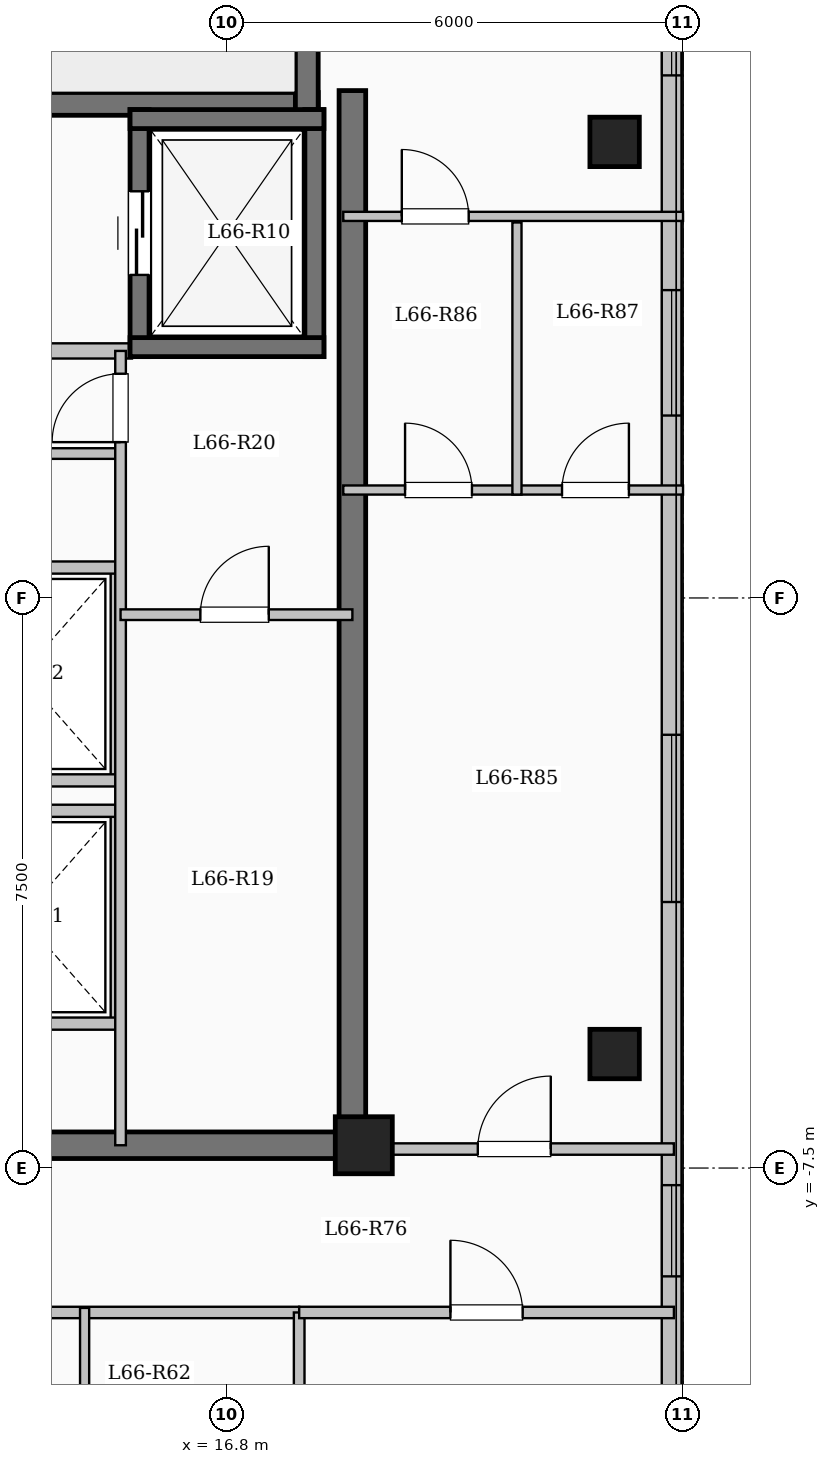
"""IFC4 building model, lengths in metres.
Left out: names, types, materials, properties, quantities, classifications, styles, units other than length and angle.
Written with IfcOpenShell. Run it as: python <this file> out.ifc"""

import sys

from ifc_helpers import new_model, si_unit, direction, frame, frame_2d, origin, origin_2d, place, context, subcontext, project, spatial, rectangle, extrude, element, fill, save


model = new_model("IFC4")
c1 = context("Model", 3, precision=1e-05, world=origin(), true_north=direction((0.0, 1.0)))
c2 = subcontext(c1, "Body", "Model", "MODEL_VIEW")
j1 = project(units=[si_unit("LENGTHUNIT", "METRE"), si_unit("PLANEANGLEUNIT", "RADIAN")], contexts=[c1])
p1 = place(None, origin())
s1 = spatial("IfcSite", under=j1, at=p1, CompositionType="ELEMENT")
p2 = place(p1, origin())
s2 = spatial("IfcBuilding", under=s1, at=p2, CompositionType="ELEMENT")
p3 = place(p2, frame((0.0, 0.0, 244.85)))
s3 = spatial("IfcBuildingStorey", under=s2, at=p3, CompositionType="ELEMENT", Elevation=244.85)
p4 = place(p3, frame((18.6, -7.2, 0.0), z_axis=(0.0, 0.0, 1.0), x_axis=(1.0, 0.0, 0.0)))
e1 = element("IfcColumn", 1, at=p4, inside=s3, PredefinedType="COLUMN", context=c2, shape_type="SweptSolid", body=[
    extrude(rectangle(XDim=0.75, YDim=0.75, at=origin_2d()), origin(), (0.0, 0.0, 1.0), 3.35),
])
for number, where, z_axis, x_axis in (
    (2, (21.9, -6.0, 0.0), (0.0, 0.0, 1.0), (1.0, 0.0, 0.0)),
    (3, (21.9, 6.0, 0.0), (0.0, 0.0, 1.0), (1.0, 0.0, 0.0)),
):
    element("IfcColumn", number, at=place(p3, frame(where, z_axis=z_axis, x_axis=x_axis)), inside=s3, PredefinedType="COLUMN", context=c2, shape_type="SweptSolid", body=[
        extrude(rectangle(XDim=0.65, YDim=0.65, at=origin_2d()), origin(), (0.0, 0.0, 1.0), 3.35),
    ])
p5 = place(p3, frame((22.65, 17.55, 0.0), z_axis=(0.0, 0.0, 1.0), x_axis=(0.0, -1.0, 0.0)))
e4 = element("IfcWall", 4, at=p5, inside=s3, PredefinedType="SOLIDWALL", context=c2, shape_type="SweptSolid", body=[
    extrude(rectangle(XDim=35.1, YDim=0.26, at=frame_2d((17.55, 0.0))), origin(), (0.0, 0.0, 1.0), 3.1),
])
p6 = place(p5, frame((1.525, 0.0, 0.9)))
e5 = element("IfcOpeningElement", 5, at=p6, cuts=e4, PredefinedType="OPENING", context=c2, shape_type="SweptSolid", body=[
    extrude(rectangle(XDim=2.0, YDim=1.7, at=frame_2d((1.0, 0.85))), frame((0.0, 0.14, 0.0), z_axis=(0.0, -1.0, 0.0), x_axis=(1.0, 0.0, 0.0)), (0.0, 0.0, 1.0), 0.28),
])
p7 = place(p5, frame((5.425, 0.0, 0.95)))
e6 = element("IfcOpeningElement", 6, at=p7, cuts=e4, PredefinedType="OPENING", context=c2, shape_type="SweptSolid", body=[
    extrude(rectangle(XDim=1.0, YDim=1.5, at=frame_2d((0.5, 0.75))), frame((0.0, 0.14, 0.0), z_axis=(0.0, -1.0, 0.0), x_axis=(1.0, 0.0, 0.0)), (0.0, 0.0, 1.0), 0.28),
])
p8 = place(p5, frame((8.675, 0.0, 0.9)))
e7 = element("IfcOpeningElement", 7, at=p8, cuts=e4, PredefinedType="OPENING", context=c2, shape_type="SweptSolid", body=[
    extrude(rectangle(XDim=2.0, YDim=1.7, at=frame_2d((1.0, 0.85))), frame((0.0, 0.14, 0.0), z_axis=(0.0, -1.0, 0.0), x_axis=(1.0, 0.0, 0.0)), (0.0, 0.0, 1.0), 0.28),
])
p9 = place(p5, frame((13.5, 0.0, 0.9)))
e8 = element("IfcOpeningElement", 8, at=p9, cuts=e4, PredefinedType="OPENING", context=c2, shape_type="SweptSolid", body=[
    extrude(rectangle(XDim=1.65, YDim=1.6, at=frame_2d((0.825, 0.8))), frame((0.0, 0.14, 0.0), z_axis=(0.0, -1.0, 0.0), x_axis=(1.0, 0.0, 0.0)), (0.0, 0.0, 1.0), 0.28),
])
p10 = place(p5, frame((19.35, 0.0, 0.9)))
e9 = element("IfcOpeningElement", 9, at=p10, cuts=e4, PredefinedType="OPENING", context=c2, shape_type="SweptSolid", body=[
    extrude(rectangle(XDim=2.2, YDim=1.75, at=frame_2d((1.1, 0.875))), frame((0.0, 0.14, 0.0), z_axis=(0.0, -1.0, 0.0), x_axis=(1.0, 0.0, 0.0)), (0.0, 0.0, 1.0), 0.28),
])
p11 = place(p5, frame((25.275, 0.0, 0.95)))
e10 = element("IfcOpeningElement", 10, at=p11, cuts=e4, PredefinedType="OPENING", context=c2, shape_type="SweptSolid", body=[
    extrude(rectangle(XDim=1.2, YDim=1.5, at=frame_2d((0.6, 0.75))), frame((0.0, 0.14, 0.0), z_axis=(0.0, -1.0, 0.0), x_axis=(1.0, 0.0, 0.0)), (0.0, 0.0, 1.0), 0.28),
])
p12 = place(p5, frame((29.925, 0.0, 0.9)))
e11 = element("IfcOpeningElement", 11, at=p12, cuts=e4, PredefinedType="OPENING", context=c2, shape_type="SweptSolid", body=[
    extrude(rectangle(XDim=2.2, YDim=1.75, at=frame_2d((1.1, 0.875))), frame((0.0, 0.14, 0.0), z_axis=(0.0, -1.0, 0.0), x_axis=(1.0, 0.0, 0.0)), (0.0, 0.0, 1.0), 0.28),
])
p13 = place(p3, frame((10.0, 6.5, 0.0), z_axis=(0.0, 0.0, 1.0), x_axis=(1.0, 0.0, 0.0)))
e12 = element("IfcWall", 12, at=p13, inside=s3, PredefinedType="SHEAR", context=c2, shape_type="SweptSolid", body=[
    extrude(rectangle(XDim=8.0, YDim=0.3, at=frame_2d((4.0, 0.0))), origin(), (0.0, 0.0, 1.0), 3.35),
])
p14 = place(p13, frame((0.55, 0.0, 0.0)))
e13 = element("IfcOpeningElement", 13, at=p14, cuts=e12, PredefinedType="OPENING", context=c2, shape_type="SweptSolid", body=[
    extrude(rectangle(XDim=1.0, YDim=2.15, at=frame_2d((0.5, 1.075))), frame((0.0, 0.16, 0.0), z_axis=(0.0, -1.0, 0.0), x_axis=(1.0, 0.0, 0.0)), (0.0, 0.0, 1.0), 0.32),
])
p15 = place(p3, frame((17.85, 6.35, 0.0), z_axis=(0.0, 0.0, 1.0), x_axis=(0.0, 1.0, 0.0)))
e14 = element("IfcWall", 14, at=p15, inside=s3, PredefinedType="SHEAR", context=c2, shape_type="SweptSolid", body=[
    extrude(rectangle(XDim=3.59, YDim=0.3, at=frame_2d((1.795, 0.0))), origin(), (0.0, 0.0, 1.0), 3.35),
])
p16 = place(p3, frame((10.15, 3.25, 0.0), z_axis=(0.0, 0.0, 1.0), x_axis=(1.0, 0.0, 0.0)))
e15 = element("IfcWall", 15, at=p16, inside=s3, PredefinedType="SOLIDWALL", context=c2, shape_type="SweptSolid", body=[
    extrude(rectangle(XDim=5.4, YDim=0.2, at=frame_2d((2.7, 0.0))), origin(), (0.0, 0.0, 1.0), 3.1),
])
p17 = place(p3, frame((15.65, 3.175, 0.0), z_axis=(0.0, 0.0, 1.0), x_axis=(0.0, 1.0, 0.0)))
e16 = element("IfcWall", 16, at=p17, inside=s3, PredefinedType="SHEAR", context=c2, shape_type="SweptSolid", body=[
    extrude(rectangle(XDim=3.25, YDim=0.25, at=frame_2d((1.625, 0.0))), origin(), (0.0, 0.0, 1.0), 3.35),
])
p18 = place(p17, frame((1.075, 0.0, 0.0)))
e17 = element("IfcOpeningElement", 17, at=p18, cuts=e16, PredefinedType="OPENING", context=c2, shape_type="SweptSolid", body=[
    extrude(rectangle(XDim=1.1, YDim=2.15, at=frame_2d((0.55, 1.075))), frame((0.0, 0.135, 0.0), z_axis=(0.0, -1.0, 0.0), x_axis=(1.0, 0.0, 0.0)), (0.0, 0.0, 1.0), 0.27),
])
p19 = place(p3, frame((17.95, 3.175, 0.0), z_axis=(0.0, 0.0, 1.0), x_axis=(0.0, 1.0, 0.0)))
e18 = element("IfcWall", 18, at=p19, inside=s3, PredefinedType="SHEAR", context=c2, shape_type="SweptSolid", body=[
    extrude(rectangle(XDim=3.25, YDim=0.25, at=frame_2d((1.625, 0.0))), origin(), (0.0, 0.0, 1.0), 3.35),
])
for number, where, z_axis, x_axis in (
    (19, (15.525, 3.3, 0.0), (0.0, 0.0, 1.0), (1.0, 0.0, 0.0)),
    (20, (15.525, 6.3, 0.0), (0.0, 0.0, 1.0), (1.0, 0.0, 0.0)),
):
    element("IfcWall", number, at=place(p3, frame(where, z_axis=z_axis, x_axis=x_axis)), inside=s3, PredefinedType="SHEAR", context=c2, shape_type="SweptSolid", body=[
        extrude(rectangle(XDim=2.55, YDim=0.25, at=frame_2d((1.275, 0.0))), origin(), (0.0, 0.0, 1.0), 3.35),
    ])
p20 = place(p3, frame((15.35, -5.6, 0.0), z_axis=(0.0, 0.0, 1.0), x_axis=(0.0, 1.0, 0.0)))
e21 = element("IfcWall", 21, at=p20, inside=s3, PredefinedType="SOLIDWALL", context=c2, shape_type="SweptSolid", body=[
    extrude(rectangle(XDim=2.8, YDim=0.16, at=frame_2d((1.4, 0.0))), origin(), (0.0, 0.0, 1.0), 3.1),
])
for number, where, z_axis, x_axis in (
    (22, (12.85, -5.6, 0.0), (0.0, 0.0, 1.0), (1.0, 0.0, 0.0)),
    (23, (12.85, -2.8, 0.0), (0.0, 0.0, 1.0), (1.0, 0.0, 0.0)),
):
    element("IfcWall", number, at=place(p3, frame(where, z_axis=z_axis, x_axis=x_axis)), inside=s3, PredefinedType="SOLIDWALL", context=c2, shape_type="SweptSolid", body=[
        extrude(rectangle(XDim=2.5, YDim=0.16, at=frame_2d((1.25, 0.0))), origin(), (0.0, 0.0, 1.0), 3.1),
    ])
p21 = place(p3, frame((15.35, -2.4, 0.0), z_axis=(0.0, 0.0, 1.0), x_axis=(0.0, 1.0, 0.0)))
e24 = element("IfcWall", 24, at=p21, inside=s3, PredefinedType="SOLIDWALL", context=c2, shape_type="SweptSolid", body=[
    extrude(rectangle(XDim=2.8, YDim=0.16, at=frame_2d((1.4, 0.0))), origin(), (0.0, 0.0, 1.0), 3.1),
])
for number, where, z_axis, x_axis in (
    (25, (12.85, -2.4, 0.0), (0.0, 0.0, 1.0), (1.0, 0.0, 0.0)),
    (26, (12.85, 0.4, 0.0), (0.0, 0.0, 1.0), (1.0, 0.0, 0.0)),
):
    element("IfcWall", number, at=place(p3, frame(where, z_axis=z_axis, x_axis=x_axis)), inside=s3, PredefinedType="SOLIDWALL", context=c2, shape_type="SweptSolid", body=[
        extrude(rectangle(XDim=2.5, YDim=0.16, at=frame_2d((1.25, 0.0))), origin(), (0.0, 0.0, 1.0), 3.1),
    ])
p22 = place(p3, frame((18.45, -7.375, 0.0), z_axis=(0.0, 0.0, 1.0), x_axis=(0.0, 1.0, 0.0)))
e27 = element("IfcWall", 27, at=p22, inside=s3, PredefinedType="SHEAR", context=c2, shape_type="SweptSolid", body=[
    extrude(rectangle(XDim=14.05, YDim=0.35, at=frame_2d((7.025, 0.0))), origin(), (0.0, 0.0, 1.0), 3.35),
])
p23 = place(p3, frame((12.625, -7.2, 0.0), z_axis=(0.0, 0.0, 1.0), x_axis=(1.0, 0.0, 0.0)))
e28 = element("IfcWall", 28, at=p23, inside=s3, PredefinedType="SHEAR", context=c2, shape_type="SweptSolid", body=[
    extrude(rectangle(XDim=6.0, YDim=0.35, at=frame_2d((3.0, 0.0))), origin(), (0.0, 0.0, 1.0), 3.35),
])
p24 = place(p3, frame((12.8, 1.9, 0.0), z_axis=(0.0, 0.0, 1.0), x_axis=(1.0, 0.0, 0.0)))
e29 = element("IfcWall", 29, at=p24, inside=s3, PredefinedType="PARTITIONING", context=c2, shape_type="SweptSolid", body=[
    extrude(rectangle(XDim=2.6, YDim=0.14, at=frame_2d((1.3, 0.0))), origin(), (0.0, 0.0, 1.0), 3.1),
])
p25 = place(p3, frame((15.4, -7.2, 0.0), z_axis=(0.0, 0.0, 1.0), x_axis=(0.0, 1.0, 0.0)))
e30 = element("IfcWall", 30, at=p25, inside=s3, PredefinedType="PARTITIONING", context=c2, shape_type="SweptSolid", body=[
    extrude(rectangle(XDim=10.45, YDim=0.14, at=frame_2d((5.225, 0.0))), origin(), (0.0, 0.0, 1.0), 3.1),
])
p26 = place(p25, frame((9.25, 0.0, 0.0)))
e31 = element("IfcOpeningElement", 31, at=p26, cuts=e30, PredefinedType="OPENING", context=c2, shape_type="SweptSolid", body=[
    extrude(rectangle(XDim=0.9, YDim=2.08, at=frame_2d((0.45, 1.04))), frame((0.0, 0.08, 0.0), z_axis=(0.0, -1.0, 0.0), x_axis=(1.0, 0.0, 0.0)), (0.0, 0.0, 1.0), 0.16),
])
p27 = place(p3, frame((15.4, -0.22, 0.0), z_axis=(0.0, 0.0, 1.0), x_axis=(1.0, 0.0, 0.0)))
e32 = element("IfcWall", 32, at=p27, inside=s3, PredefinedType="PARTITIONING", context=c2, shape_type="SweptSolid", body=[
    extrude(rectangle(XDim=3.05, YDim=0.14, at=frame_2d((1.525, 0.0))), origin(), (0.0, 0.0, 1.0), 3.1),
])
p28 = place(p27, frame((1.05, 0.0, 0.0)))
e33 = element("IfcOpeningElement", 33, at=p28, cuts=e32, PredefinedType="OPENING", context=c2, shape_type="SweptSolid", body=[
    extrude(rectangle(XDim=0.9, YDim=2.08, at=frame_2d((0.45, 1.04))), frame((0.0, 0.08, 0.0), z_axis=(0.0, -1.0, 0.0), x_axis=(1.0, 0.0, 0.0)), (0.0, 0.0, 1.0), 0.16),
])
p29 = place(p3, frame((8.55, -9.4, 0.0), z_axis=(0.0, 0.0, 1.0), x_axis=(1.0, 0.0, 0.0)))
e34 = element("IfcWall", 34, at=p29, inside=s3, PredefinedType="PARTITIONING", context=c2, shape_type="SweptSolid", body=[
    extrude(rectangle(XDim=9.2, YDim=0.15, at=frame_2d((4.6, 0.0))), origin(), (0.0, 0.0, 1.0), 3.1),
])
p30 = place(p29, frame((0.75, 0.0, 0.0)))
e35 = element("IfcOpeningElement", 35, at=p30, cuts=e34, PredefinedType="OPENING", context=c2, shape_type="SweptSolid", body=[
    extrude(rectangle(XDim=0.96, YDim=2.15, at=frame_2d((0.48, 1.075))), frame((0.0, 0.085, 0.0), z_axis=(0.0, -1.0, 0.0), x_axis=(1.0, 0.0, 0.0)), (0.0, 0.0, 1.0), 0.17),
])
p31 = place(p3, frame((14.927, -12.14, 0.0), z_axis=(0.0, 0.0, 1.0), x_axis=(0.0, 1.0, 0.0)))
e36 = element("IfcWall", 36, at=p31, inside=s3, PredefinedType="PARTITIONING", context=c2, shape_type="SweptSolid", body=[
    extrude(rectangle(XDim=2.8, YDim=0.12, at=frame_2d((1.4, 0.0))), origin(), (0.0, 0.0, 1.0), 2.685),
])
p32 = place(p3, frame((18.45, -7.25, 0.0), z_axis=(0.0, 0.0, 1.0), x_axis=(1.0, 0.0, 0.0)))
e37 = element("IfcWall", 37, at=p32, inside=s3, PredefinedType="PARTITIONING", context=c2, shape_type="SweptSolid", body=[
    extrude(rectangle(XDim=4.23, YDim=0.15, at=frame_2d((2.115, 0.0))), origin(), (0.0, 0.0, 1.0), 3.1),
])
p33 = place(p32, frame((1.65, 0.0, 0.0)))
e38 = element("IfcOpeningElement", 38, at=p33, cuts=e37, PredefinedType="OPENING", context=c2, shape_type="SweptSolid", body=[
    extrude(rectangle(XDim=0.96, YDim=2.15, at=frame_2d((0.48, 1.075))), frame((0.0, 0.085, 0.0), z_axis=(0.0, -1.0, 0.0), x_axis=(1.0, 0.0, 0.0)), (0.0, 0.0, 1.0), 0.17),
])
p34 = place(p3, frame((17.75, -17.55, 0.0), z_axis=(0.0, 0.0, 1.0), x_axis=(0.0, 1.0, 0.0)))
e39 = element("IfcWall", 39, at=p34, inside=s3, PredefinedType="PARTITIONING", context=c2, shape_type="SweptSolid", body=[
    extrude(rectangle(XDim=8.15, YDim=0.14, at=frame_2d((4.075, 0.0))), origin(), (0.0, 0.0, 1.0), 3.1),
])
p35 = place(p3, frame((17.75, -9.4, 0.0), z_axis=(0.0, 0.0, 1.0), x_axis=(1.0, 0.0, 0.0)))
e40 = element("IfcWall", 40, at=p35, inside=s3, PredefinedType="PARTITIONING", context=c2, shape_type="SweptSolid", body=[
    extrude(rectangle(XDim=4.93, YDim=0.15, at=frame_2d((2.465, 0.0))), origin(), (0.0, 0.0, 1.0), 3.1),
])
p36 = place(p35, frame((1.99, 0.0, 0.0)))
e41 = element("IfcOpeningElement", 41, at=p36, cuts=e40, PredefinedType="OPENING", context=c2, shape_type="SweptSolid", body=[
    extrude(rectangle(XDim=0.95, YDim=2.15, at=frame_2d((0.475, 1.075))), frame((0.0, 0.085, 0.0), z_axis=(0.0, -1.0, 0.0), x_axis=(1.0, 0.0, 0.0)), (0.0, 0.0, 1.0), 0.17),
])
p37 = place(p3, frame((18.33, 1.42, 0.0), z_axis=(0.0, 0.0, 1.0), x_axis=(1.0, 0.0, 0.0)))
e42 = element("IfcWall", 42, at=p37, inside=s3, PredefinedType="PARTITIONING", context=c2, shape_type="SweptSolid", body=[
    extrude(rectangle(XDim=4.47, YDim=0.12, at=frame_2d((2.235, 0.0))), origin(), (0.0, 0.0, 1.0), 3.1),
])
p38 = place(p37, frame((0.813, 0.0, 0.0)))
e43 = element("IfcOpeningElement", 43, at=p38, cuts=e42, PredefinedType="OPENING", context=c2, shape_type="SweptSolid", body=[
    extrude(rectangle(XDim=0.88, YDim=2.1, at=frame_2d((0.44, 1.05))), frame((0.0, 0.07, 0.0), z_axis=(0.0, -1.0, 0.0), x_axis=(1.0, 0.0, 0.0)), (0.0, 0.0, 1.0), 0.14),
])
p39 = place(p37, frame((2.878, 0.0, 0.0)))
e44 = element("IfcOpeningElement", 44, at=p39, cuts=e42, PredefinedType="OPENING", context=c2, shape_type="SweptSolid", body=[
    extrude(rectangle(XDim=0.88, YDim=2.1, at=frame_2d((0.44, 1.05))), frame((0.0, 0.07, 0.0), z_axis=(0.0, -1.0, 0.0), x_axis=(1.0, 0.0, 0.0)), (0.0, 0.0, 1.0), 0.14),
])
p40 = place(p3, frame((18.33, 5.02, 0.0), z_axis=(0.0, 0.0, 1.0), x_axis=(1.0, 0.0, 0.0)))
e45 = element("IfcWall", 45, at=p40, inside=s3, PredefinedType="PARTITIONING", context=c2, shape_type="SweptSolid", body=[
    extrude(rectangle(XDim=4.47, YDim=0.12, at=frame_2d((2.235, 0.0))), origin(), (0.0, 0.0, 1.0), 3.1),
])
p41 = place(p40, frame((0.77, 0.0, 0.0)))
e46 = element("IfcOpeningElement", 46, at=p41, cuts=e45, PredefinedType="OPENING", context=c2, shape_type="SweptSolid", body=[
    extrude(rectangle(XDim=0.88, YDim=2.1, at=frame_2d((0.44, 1.05))), frame((0.0, 0.07, 0.0), z_axis=(0.0, -1.0, 0.0), x_axis=(1.0, 0.0, 0.0)), (0.0, 0.0, 1.0), 0.14),
])
p42 = place(p3, frame((20.615, 1.36, 0.0), z_axis=(0.0, 0.0, 1.0), x_axis=(0.0, 1.0, 0.0)))
e47 = element("IfcWall", 47, at=p42, inside=s3, PredefinedType="PARTITIONING", context=c2, shape_type="SweptSolid", body=[
    extrude(rectangle(XDim=3.58, YDim=0.12, at=frame_2d((1.79, 0.0))), origin(), (0.0, 0.0, 1.0), 3.1),
])
p43 = place(p8, origin())
e48 = element("IfcWindow", 48, at=p43, inside=s3, PartitioningType="SINGLE_PANEL", PredefinedType="WINDOW", context=c2, shape_type="SweptSolid", body=[
    extrude(rectangle(XDim=2.0, YDim=1.7, at=frame_2d((1.0, 0.85))), frame((0.0, 0.03, 0.0), z_axis=(0.0, -1.0, 0.0), x_axis=(1.0, 0.0, 0.0)), (0.0, 0.0, 1.0), 0.06),
])
fill(e7, e48)
p44 = place(p9, origin())
e49 = element("IfcWindow", 49, at=p44, inside=s3, PartitioningType="SINGLE_PANEL", PredefinedType="WINDOW", context=c2, shape_type="SweptSolid", body=[
    extrude(rectangle(XDim=1.65, YDim=1.6, at=frame_2d((0.825, 0.8))), frame((0.0, 0.03, 0.0), z_axis=(0.0, -1.0, 0.0), x_axis=(1.0, 0.0, 0.0)), (0.0, 0.0, 1.0), 0.06),
])
fill(e8, e49)
p45 = place(p10, origin())
e50 = element("IfcWindow", 50, at=p45, inside=s3, PartitioningType="SINGLE_PANEL", PredefinedType="WINDOW", context=c2, shape_type="SweptSolid", body=[
    extrude(rectangle(XDim=2.2, YDim=1.75, at=frame_2d((1.1, 0.875))), frame((0.0, 0.03, 0.0), z_axis=(0.0, -1.0, 0.0), x_axis=(1.0, 0.0, 0.0)), (0.0, 0.0, 1.0), 0.06),
])
fill(e9, e50)
p46 = place(p11, origin())
e51 = element("IfcWindow", 51, at=p46, inside=s3, PartitioningType="SINGLE_PANEL", PredefinedType="WINDOW", context=c2, shape_type="SweptSolid", body=[
    extrude(rectangle(XDim=1.2, YDim=1.5, at=frame_2d((0.6, 0.75))), frame((0.0, 0.03, 0.0), z_axis=(0.0, -1.0, 0.0), x_axis=(1.0, 0.0, 0.0)), (0.0, 0.0, 1.0), 0.06),
])
fill(e10, e51)
p47 = place(p18, origin())
e52 = element("IfcDoor", 52, at=p47, inside=s3, OperationType="SLIDING_TO_LEFT", PredefinedType="DOOR", context=c2, shape_type="SweptSolid", body=[
    extrude(rectangle(XDim=1.1, YDim=2.15, at=frame_2d((0.55, 1.075))), frame((0.0, 0.025, 0.0), z_axis=(0.0, -1.0, 0.0), x_axis=(1.0, 0.0, 0.0)), (0.0, 0.0, 1.0), 0.05),
])
fill(e17, e52)
p48 = place(p26, origin())
e53 = element("IfcDoor", 53, at=p48, inside=s3, OperationType="SINGLE_SWING_LEFT", PredefinedType="DOOR", context=c2, shape_type="SweptSolid", body=[
    extrude(rectangle(XDim=0.9, YDim=2.08, at=frame_2d((0.45, 1.04))), frame((0.0, 0.025, 0.0), z_axis=(0.0, -1.0, 0.0), x_axis=(1.0, 0.0, 0.0)), (0.0, 0.0, 1.0), 0.05),
])
fill(e31, e53)
p49 = place(p28, origin())
e54 = element("IfcDoor", 54, at=p49, inside=s3, OperationType="SINGLE_SWING_RIGHT", PredefinedType="DOOR", context=c2, shape_type="SweptSolid", body=[
    extrude(rectangle(XDim=0.9, YDim=2.08, at=frame_2d((0.45, 1.04))), frame((0.0, 0.025, 0.0), z_axis=(0.0, -1.0, 0.0), x_axis=(1.0, 0.0, 0.0)), (0.0, 0.0, 1.0), 0.05),
])
fill(e33, e54)
p50 = place(p36, origin())
e55 = element("IfcDoor", 55, at=p50, inside=s3, OperationType="SINGLE_SWING_LEFT", PredefinedType="DOOR", context=c2, shape_type="SweptSolid", body=[
    extrude(rectangle(XDim=0.95, YDim=2.15, at=frame_2d((0.475, 1.075))), frame((0.0, 0.025, 0.0), z_axis=(0.0, -1.0, 0.0), x_axis=(1.0, 0.0, 0.0)), (0.0, 0.0, 1.0), 0.05),
])
fill(e41, e55)
p51 = place(p33, origin())
e56 = element("IfcDoor", 56, at=p51, inside=s3, OperationType="SINGLE_SWING_RIGHT", PredefinedType="DOOR", context=c2, shape_type="SweptSolid", body=[
    extrude(rectangle(XDim=0.96, YDim=2.15, at=frame_2d((0.48, 1.075))), frame((0.0, 0.025, 0.0), z_axis=(0.0, -1.0, 0.0), x_axis=(1.0, 0.0, 0.0)), (0.0, 0.0, 1.0), 0.05),
])
fill(e38, e56)
p52 = place(p38, origin())
e57 = element("IfcDoor", 57, at=p52, inside=s3, OperationType="SINGLE_SWING_LEFT", PredefinedType="DOOR", context=c2, shape_type="SweptSolid", body=[
    extrude(rectangle(XDim=0.88, YDim=2.1, at=frame_2d((0.44, 1.05))), frame((0.0, 0.025, 0.0), z_axis=(0.0, -1.0, 0.0), x_axis=(1.0, 0.0, 0.0)), (0.0, 0.0, 1.0), 0.05),
])
fill(e43, e57)
p53 = place(p39, origin())
e58 = element("IfcDoor", 58, at=p53, inside=s3, OperationType="SINGLE_SWING_RIGHT", PredefinedType="DOOR", context=c2, shape_type="SweptSolid", body=[
    extrude(rectangle(XDim=0.88, YDim=2.1, at=frame_2d((0.44, 1.05))), frame((0.0, 0.025, 0.0), z_axis=(0.0, -1.0, 0.0), x_axis=(1.0, 0.0, 0.0)), (0.0, 0.0, 1.0), 0.05),
])
fill(e44, e58)
p54 = place(p41, origin())
e59 = element("IfcDoor", 59, at=p54, inside=s3, OperationType="SINGLE_SWING_LEFT", PredefinedType="DOOR", context=c2, shape_type="SweptSolid", body=[
    extrude(rectangle(XDim=0.88, YDim=2.1, at=frame_2d((0.44, 1.05))), frame((0.0, 0.025, 0.0), z_axis=(0.0, -1.0, 0.0), x_axis=(1.0, 0.0, 0.0)), (0.0, 0.0, 1.0), 0.05),
])
fill(e46, e59)
save(model, sys.argv[1])
